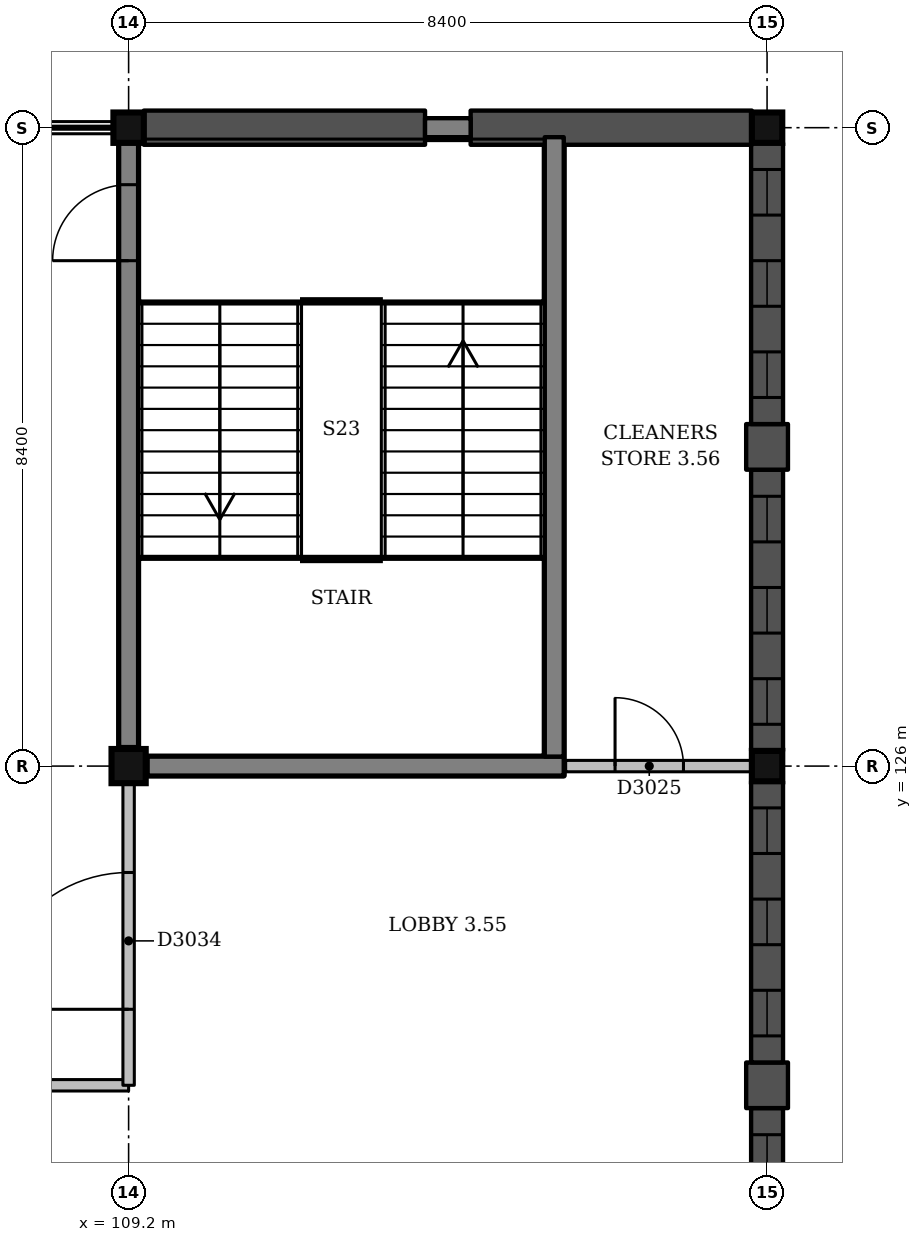
"""IFC4 building model, lengths in metres.
Left out: names, types, materials, properties, quantities, classifications, styles, units other than length and angle.
Written with IfcOpenShell. Run it as: python <this file> out.ifc"""

import sys

from ifc_helpers import new_model, si_unit, direction, frame, frame_2d, origin, origin_2d, place, context, subcontext, project, spatial, rectangle, extrude, element, fill, save


model = new_model("IFC4")
c1 = context("Model", 3, precision=1e-05, world=origin(), true_north=direction((0.0, 1.0)))
c2 = subcontext(c1, "Body", "Model", "MODEL_VIEW")
j1 = project(units=[si_unit("LENGTHUNIT", "METRE"), si_unit("PLANEANGLEUNIT", "RADIAN")], contexts=[c1])
p1 = place(None, origin())
s1 = spatial("IfcSite", under=j1, at=p1, CompositionType="ELEMENT")
p2 = place(p1, origin())
s2 = spatial("IfcBuilding", under=s1, at=p2, CompositionType="ELEMENT")
p3 = place(p2, frame((0.0, 0.0, 13.5)))
s3 = spatial("IfcBuildingStorey", under=s2, at=p3, CompositionType="ELEMENT", Elevation=13.5)
p4 = place(p3, frame((109.2, 126.0, 0.0), z_axis=(0.0, 0.0, 1.0), x_axis=(1.0, 0.0, 0.0)))
e1 = element("IfcColumn", 1, at=p4, inside=s3, PredefinedType="COLUMN", context=c2, shape_type="SweptSolid", body=[
    extrude(rectangle(XDim=0.45, YDim=0.45, at=origin_2d()), origin(), (0.0, 0.0, 1.0), 4.5),
])
for number, where, z_axis, x_axis in (
    (2, (109.2, 134.4, 0.0), (0.0, 0.0, 1.0), (1.0, 0.0, 0.0)),
    (3, (117.6, 126.0, 0.0), (0.0, 0.0, 1.0), (1.0, 0.0, 0.0)),
    (4, (117.6, 134.4, 0.0), (0.0, 0.0, 1.0), (1.0, 0.0, 0.0)),
):
    element("IfcColumn", number, at=place(p3, frame(where, z_axis=z_axis, x_axis=x_axis)), inside=s3, PredefinedType="COLUMN", context=c2, shape_type="SweptSolid", body=[
        extrude(rectangle(XDim=0.4, YDim=0.4, at=origin_2d()), origin(), (0.0, 0.0, 1.0), 4.5),
    ])
p5 = place(p3, frame((109.45, 126.0, 0.0), z_axis=(0.0, 0.0, 1.0), x_axis=(1.0, 0.0, 0.0)))
e5 = element("IfcWall", 5, at=p5, inside=s3, PredefinedType="SHEAR", context=c2, shape_type="SweptSolid", body=[
    extrude(rectangle(XDim=5.475, YDim=0.25, at=frame_2d((2.738, 0.0))), origin(), (0.0, 0.0, 1.0), 4.5),
])
p6 = place(p3, frame((109.2, 126.25, 0.0), z_axis=(0.0, 0.0, 1.0), x_axis=(0.0, 1.0, 0.0)))
e6 = element("IfcWall", 6, at=p6, inside=s3, PredefinedType="SHEAR", context=c2, shape_type="SweptSolid", body=[
    extrude(rectangle(XDim=7.95, YDim=0.25, at=frame_2d((3.975, 0.0))), origin(), (0.0, 0.0, 1.0), 4.5),
])
p7 = place(p6, frame((6.4, 0.0, 0.0)))
e7 = element("IfcOpeningElement", 7, at=p7, cuts=e6, PredefinedType="OPENING", context=c2, shape_type="SweptSolid", body=[
    extrude(rectangle(XDim=1.0, YDim=2.1, at=frame_2d((0.5, 1.05))), frame((0.0, 0.135, 0.0), z_axis=(0.0, -1.0, 0.0), x_axis=(1.0, 0.0, 0.0)), (0.0, 0.0, 1.0), 0.27),
])
p8 = place(p3, frame((114.8, 126.125, 0.0), z_axis=(0.0, 0.0, 1.0), x_axis=(0.0, 1.0, 0.0)))
e8 = element("IfcWall", 8, at=p8, inside=s3, PredefinedType="SHEAR", context=c2, shape_type="SweptSolid", body=[
    extrude(rectangle(XDim=8.15, YDim=0.25, at=frame_2d((4.075, 0.0))), origin(), (0.0, 0.0, 1.0), 4.5),
])
p9 = place(p3, frame((117.6, 117.8, 0.0), z_axis=(0.0, 0.0, 1.0), x_axis=(0.0, 1.0, 0.0)))
e9 = element("IfcWall", 9, at=p9, inside=s3, PredefinedType="SOLIDWALL", context=c2, shape_type="SweptSolid", body=[
    extrude(rectangle(XDim=3.7, YDim=0.42, at=frame_2d((1.85, 0.0))), origin(), (0.0, 0.0, 1.0), 3.45),
])
p10 = place(p9, frame((0.35, 0.0, 1.0)))
e10 = element("IfcOpeningElement", 10, at=p10, cuts=e9, PredefinedType="OPENING", context=c2, shape_type="SweptSolid", body=[
    extrude(rectangle(XDim=0.6, YDim=2.1, at=frame_2d((0.3, 1.05))), frame((0.0, 0.22, 0.0), z_axis=(0.0, -1.0, 0.0), x_axis=(1.0, 0.0, 0.0)), (0.0, 0.0, 1.0), 0.44),
])
p11 = place(p9, frame((1.55, 0.0, 1.0)))
e11 = element("IfcOpeningElement", 11, at=p11, cuts=e9, PredefinedType="OPENING", context=c2, shape_type="SweptSolid", body=[
    extrude(rectangle(XDim=0.6, YDim=2.1, at=frame_2d((0.3, 1.05))), frame((0.0, 0.22, 0.0), z_axis=(0.0, -1.0, 0.0), x_axis=(1.0, 0.0, 0.0)), (0.0, 0.0, 1.0), 0.44),
])
p12 = place(p9, frame((2.75, 0.0, 1.0)))
e12 = element("IfcOpeningElement", 12, at=p12, cuts=e9, PredefinedType="OPENING", context=c2, shape_type="SweptSolid", body=[
    extrude(rectangle(XDim=0.6, YDim=2.1, at=frame_2d((0.3, 1.05))), frame((0.0, 0.22, 0.0), z_axis=(0.0, -1.0, 0.0), x_axis=(1.0, 0.0, 0.0)), (0.0, 0.0, 1.0), 0.44),
])
p13 = place(p3, frame((117.6, 121.5, 0.0), z_axis=(0.0, 0.0, 1.0), x_axis=(0.0, 1.0, 0.0)))
e13 = element("IfcWall", 13, at=p13, inside=s3, PredefinedType="SOLIDWALL", context=c2, shape_type="SweptSolid", body=[
    extrude(rectangle(XDim=0.6, YDim=0.55, at=frame_2d((0.3, 0.0))), origin(), (0.0, 0.0, 1.0), 3.45),
])
p14 = place(p3, frame((117.6, 122.1, 0.0), z_axis=(0.0, 0.0, 1.0), x_axis=(0.0, 1.0, 0.0)))
e14 = element("IfcWall", 14, at=p14, inside=s3, PredefinedType="SOLIDWALL", context=c2, shape_type="SweptSolid", body=[
    extrude(rectangle(XDim=3.7, YDim=0.42, at=frame_2d((1.85, 0.0))), origin(), (0.0, 0.0, 1.0), 3.45),
])
p15 = place(p14, frame((0.35, 0.0, 1.0)))
e15 = element("IfcOpeningElement", 15, at=p15, cuts=e14, PredefinedType="OPENING", context=c2, shape_type="SweptSolid", body=[
    extrude(rectangle(XDim=0.6, YDim=2.1, at=frame_2d((0.3, 1.05))), frame((0.0, 0.22, 0.0), z_axis=(0.0, -1.0, 0.0), x_axis=(1.0, 0.0, 0.0)), (0.0, 0.0, 1.0), 0.44),
])
p16 = place(p14, frame((1.55, 0.0, 1.0)))
e16 = element("IfcOpeningElement", 16, at=p16, cuts=e14, PredefinedType="OPENING", context=c2, shape_type="SweptSolid", body=[
    extrude(rectangle(XDim=0.6, YDim=2.1, at=frame_2d((0.3, 1.05))), frame((0.0, 0.22, 0.0), z_axis=(0.0, -1.0, 0.0), x_axis=(1.0, 0.0, 0.0)), (0.0, 0.0, 1.0), 0.44),
])
p17 = place(p14, frame((2.75, 0.0, 1.0)))
e17 = element("IfcOpeningElement", 17, at=p17, cuts=e14, PredefinedType="OPENING", context=c2, shape_type="SweptSolid", body=[
    extrude(rectangle(XDim=0.6, YDim=2.1, at=frame_2d((0.3, 1.05))), frame((0.0, 0.22, 0.0), z_axis=(0.0, -1.0, 0.0), x_axis=(1.0, 0.0, 0.0)), (0.0, 0.0, 1.0), 0.44),
])
p18 = place(p3, frame((117.6, 126.2, 0.0), z_axis=(0.0, 0.0, 1.0), x_axis=(0.0, 1.0, 0.0)))
e18 = element("IfcWall", 18, at=p18, inside=s3, PredefinedType="SOLIDWALL", context=c2, shape_type="SweptSolid", body=[
    extrude(rectangle(XDim=3.7, YDim=0.42, at=frame_2d((1.85, 0.0))), origin(), (0.0, 0.0, 1.0), 3.45),
])
p19 = place(p18, frame((0.35, 0.0, 1.0)))
e19 = element("IfcOpeningElement", 19, at=p19, cuts=e18, PredefinedType="OPENING", context=c2, shape_type="SweptSolid", body=[
    extrude(rectangle(XDim=0.6, YDim=2.1, at=frame_2d((0.3, 1.05))), frame((0.0, 0.22, 0.0), z_axis=(0.0, -1.0, 0.0), x_axis=(1.0, 0.0, 0.0)), (0.0, 0.0, 1.0), 0.44),
])
p20 = place(p18, frame((1.55, 0.0, 1.0)))
e20 = element("IfcOpeningElement", 20, at=p20, cuts=e18, PredefinedType="OPENING", context=c2, shape_type="SweptSolid", body=[
    extrude(rectangle(XDim=0.6, YDim=2.1, at=frame_2d((0.3, 1.05))), frame((0.0, 0.22, 0.0), z_axis=(0.0, -1.0, 0.0), x_axis=(1.0, 0.0, 0.0)), (0.0, 0.0, 1.0), 0.44),
])
p21 = place(p18, frame((2.75, 0.0, 1.0)))
e21 = element("IfcOpeningElement", 21, at=p21, cuts=e18, PredefinedType="OPENING", context=c2, shape_type="SweptSolid", body=[
    extrude(rectangle(XDim=0.6, YDim=2.1, at=frame_2d((0.3, 1.05))), frame((0.0, 0.22, 0.0), z_axis=(0.0, -1.0, 0.0), x_axis=(1.0, 0.0, 0.0)), (0.0, 0.0, 1.0), 0.44),
])
p22 = place(p3, frame((117.6, 129.9, 0.0), z_axis=(0.0, 0.0, 1.0), x_axis=(0.0, 1.0, 0.0)))
e22 = element("IfcWall", 22, at=p22, inside=s3, PredefinedType="SOLIDWALL", context=c2, shape_type="SweptSolid", body=[
    extrude(rectangle(XDim=0.6, YDim=0.55, at=frame_2d((0.3, 0.0))), origin(), (0.0, 0.0, 1.0), 3.45),
])
p23 = place(p3, frame((117.6, 130.5, 0.0), z_axis=(0.0, 0.0, 1.0), x_axis=(0.0, 1.0, 0.0)))
e23 = element("IfcWall", 23, at=p23, inside=s3, PredefinedType="SOLIDWALL", context=c2, shape_type="SweptSolid", body=[
    extrude(rectangle(XDim=3.7, YDim=0.42, at=frame_2d((1.85, 0.0))), origin(), (0.0, 0.0, 1.0), 3.45),
])
p24 = place(p23, frame((0.35, 0.0, 1.0)))
e24 = element("IfcOpeningElement", 24, at=p24, cuts=e23, PredefinedType="OPENING", context=c2, shape_type="SweptSolid", body=[
    extrude(rectangle(XDim=0.6, YDim=2.1, at=frame_2d((0.3, 1.05))), frame((0.0, 0.22, 0.0), z_axis=(0.0, -1.0, 0.0), x_axis=(1.0, 0.0, 0.0)), (0.0, 0.0, 1.0), 0.44),
])
p25 = place(p23, frame((1.55, 0.0, 1.0)))
e25 = element("IfcOpeningElement", 25, at=p25, cuts=e23, PredefinedType="OPENING", context=c2, shape_type="SweptSolid", body=[
    extrude(rectangle(XDim=0.6, YDim=2.1, at=frame_2d((0.3, 1.05))), frame((0.0, 0.22, 0.0), z_axis=(0.0, -1.0, 0.0), x_axis=(1.0, 0.0, 0.0)), (0.0, 0.0, 1.0), 0.44),
])
p26 = place(p23, frame((2.75, 0.0, 1.0)))
e26 = element("IfcOpeningElement", 26, at=p26, cuts=e23, PredefinedType="OPENING", context=c2, shape_type="SweptSolid", body=[
    extrude(rectangle(XDim=0.6, YDim=2.1, at=frame_2d((0.3, 1.05))), frame((0.0, 0.22, 0.0), z_axis=(0.0, -1.0, 0.0), x_axis=(1.0, 0.0, 0.0)), (0.0, 0.0, 1.0), 0.44),
])
p27 = place(p3, frame((117.4, 134.4, 0.0), z_axis=(0.0, 0.0, 1.0), x_axis=(-1.0, 0.0, 0.0)))
e27 = element("IfcWall", 27, at=p27, inside=s3, PredefinedType="SOLIDWALL", context=c2, shape_type="SweptSolid", body=[
    extrude(rectangle(XDim=3.7, YDim=0.45, at=frame_2d((1.85, 0.0))), origin(), (0.0, 0.0, 1.0), 3.45),
])
p28 = place(p3, frame((113.1, 134.4, 0.0), z_axis=(0.0, 0.0, 1.0), x_axis=(-1.0, 0.0, 0.0)))
e28 = element("IfcWall", 28, at=p28, inside=s3, PredefinedType="SOLIDWALL", context=c2, shape_type="SweptSolid", body=[
    extrude(rectangle(XDim=3.7, YDim=0.45, at=frame_2d((1.85, 0.0))), origin(), (0.0, 0.0, 1.0), 3.45),
])
p29 = place(p3, frame((92.4, 121.8, 0.0), z_axis=(0.0, 0.0, 1.0), x_axis=(1.0, 0.0, 0.0)))
e29 = element("IfcWall", 29, at=p29, inside=s3, PredefinedType="PARTITIONING", context=c2, shape_type="SweptSolid", body=[
    extrude(rectangle(XDim=16.8, YDim=0.15, at=frame_2d((8.4, 0.0))), origin(), (0.0, 0.0, 1.0), 3.4),
])
p30 = place(p29, frame((0.3, 0.0, 0.0)))
e30 = element("IfcOpeningElement", 30, at=p30, cuts=e29, PredefinedType="OPENING", context=c2, shape_type="SweptSolid", body=[
    extrude(rectangle(XDim=1.8, YDim=2.1, at=frame_2d((0.9, 1.05))), frame((0.0, 0.085, 0.0), z_axis=(0.0, -1.0, 0.0), x_axis=(1.0, 0.0, 0.0)), (0.0, 0.0, 1.0), 0.17),
])
p31 = place(p3, frame((114.95, 126.0, 0.0), z_axis=(0.0, 0.0, 1.0), x_axis=(1.0, 0.0, 0.0)))
e31 = element("IfcWall", 31, at=p31, inside=s3, PredefinedType="PARTITIONING", context=c2, shape_type="SweptSolid", body=[
    extrude(rectangle(XDim=2.45, YDim=0.15, at=frame_2d((1.225, 0.0))), origin(), (0.0, 0.0, 1.0), 3.6),
])
p32 = place(p31, frame((0.65, 0.0, 0.0)))
e32 = element("IfcOpeningElement", 32, at=p32, cuts=e31, PredefinedType="OPENING", context=c2, shape_type="SweptSolid", body=[
    extrude(rectangle(XDim=0.9, YDim=2.1, at=frame_2d((0.45, 1.05))), frame((0.0, 0.085, 0.0), z_axis=(0.0, -1.0, 0.0), x_axis=(1.0, 0.0, 0.0)), (0.0, 0.0, 1.0), 0.17),
])
p33 = place(p3, frame((109.2, 121.8, 0.0), z_axis=(0.0, 0.0, 1.0), x_axis=(0.0, 1.0, 0.0)))
e33 = element("IfcWall", 33, at=p33, inside=s3, PredefinedType="PARTITIONING", context=c2, shape_type="SweptSolid", body=[
    extrude(rectangle(XDim=3.975, YDim=0.15, at=frame_2d((1.987, 0.0))), origin(), (0.0, 0.0, 1.0), 3.5),
])
p34 = place(p33, frame((1.0, 0.0, 0.0)))
e34 = element("IfcOpeningElement", 34, at=p34, cuts=e33, PredefinedType="OPENING", context=c2, shape_type="SweptSolid", body=[
    extrude(rectangle(XDim=1.8, YDim=2.1, at=frame_2d((0.9, 1.05))), frame((0.0, 0.085, 0.0), z_axis=(0.0, -1.0, 0.0), x_axis=(1.0, 0.0, 0.0)), (0.0, 0.0, 1.0), 0.17),
])
p35 = place(p3, frame((113.1, 134.4, 0.0), z_axis=(0.0, 0.0, 1.0), x_axis=(1.0, 0.0, 0.0)))
e35 = element("IfcWall", 35, at=p35, inside=s3, PredefinedType="SHEAR", context=c2, shape_type="SweptSolid", body=[
    extrude(rectangle(XDim=0.6, YDim=0.25, at=frame_2d((0.3, 0.0))), origin(), (0.0, 0.0, 1.0), 4.5),
])
p36 = place(p12, origin())
e36 = element("IfcWindow", 36, at=p36, inside=s3, PartitioningType="SINGLE_PANEL", PredefinedType="WINDOW", context=c2, shape_type="SweptSolid", body=[
    extrude(rectangle(XDim=0.6, YDim=2.1, at=frame_2d((0.3, 1.05))), frame((0.0, 0.15, 0.0), z_axis=(0.0, -1.0, 0.0), x_axis=(1.0, 0.0, 0.0)), (0.0, 0.0, 1.0), 0.06),
])
fill(e12, e36)
p37 = place(p15, origin())
e37 = element("IfcWindow", 37, at=p37, inside=s3, PartitioningType="SINGLE_PANEL", PredefinedType="WINDOW", context=c2, shape_type="SweptSolid", body=[
    extrude(rectangle(XDim=0.6, YDim=2.1, at=frame_2d((0.3, 1.05))), frame((0.0, 0.15, 0.0), z_axis=(0.0, -1.0, 0.0), x_axis=(1.0, 0.0, 0.0)), (0.0, 0.0, 1.0), 0.06),
])
fill(e15, e37)
p38 = place(p16, origin())
e38 = element("IfcWindow", 38, at=p38, inside=s3, PartitioningType="SINGLE_PANEL", PredefinedType="WINDOW", context=c2, shape_type="SweptSolid", body=[
    extrude(rectangle(XDim=0.6, YDim=2.1, at=frame_2d((0.3, 1.05))), frame((0.0, 0.15, 0.0), z_axis=(0.0, -1.0, 0.0), x_axis=(1.0, 0.0, 0.0)), (0.0, 0.0, 1.0), 0.06),
])
fill(e16, e38)
p39 = place(p17, origin())
e39 = element("IfcWindow", 39, at=p39, inside=s3, PartitioningType="SINGLE_PANEL", PredefinedType="WINDOW", context=c2, shape_type="SweptSolid", body=[
    extrude(rectangle(XDim=0.6, YDim=2.1, at=frame_2d((0.3, 1.05))), frame((0.0, 0.15, 0.0), z_axis=(0.0, -1.0, 0.0), x_axis=(1.0, 0.0, 0.0)), (0.0, 0.0, 1.0), 0.06),
])
fill(e17, e39)
p40 = place(p19, origin())
e40 = element("IfcWindow", 40, at=p40, inside=s3, PartitioningType="SINGLE_PANEL", PredefinedType="WINDOW", context=c2, shape_type="SweptSolid", body=[
    extrude(rectangle(XDim=0.6, YDim=2.1, at=frame_2d((0.3, 1.05))), frame((0.0, 0.15, 0.0), z_axis=(0.0, -1.0, 0.0), x_axis=(1.0, 0.0, 0.0)), (0.0, 0.0, 1.0), 0.06),
])
fill(e19, e40)
p41 = place(p20, origin())
e41 = element("IfcWindow", 41, at=p41, inside=s3, PartitioningType="SINGLE_PANEL", PredefinedType="WINDOW", context=c2, shape_type="SweptSolid", body=[
    extrude(rectangle(XDim=0.6, YDim=2.1, at=frame_2d((0.3, 1.05))), frame((0.0, 0.15, 0.0), z_axis=(0.0, -1.0, 0.0), x_axis=(1.0, 0.0, 0.0)), (0.0, 0.0, 1.0), 0.06),
])
fill(e20, e41)
p42 = place(p21, origin())
e42 = element("IfcWindow", 42, at=p42, inside=s3, PartitioningType="SINGLE_PANEL", PredefinedType="WINDOW", context=c2, shape_type="SweptSolid", body=[
    extrude(rectangle(XDim=0.6, YDim=2.1, at=frame_2d((0.3, 1.05))), frame((0.0, 0.15, 0.0), z_axis=(0.0, -1.0, 0.0), x_axis=(1.0, 0.0, 0.0)), (0.0, 0.0, 1.0), 0.06),
])
fill(e21, e42)
p43 = place(p24, origin())
e43 = element("IfcWindow", 43, at=p43, inside=s3, PartitioningType="SINGLE_PANEL", PredefinedType="WINDOW", context=c2, shape_type="SweptSolid", body=[
    extrude(rectangle(XDim=0.6, YDim=2.1, at=frame_2d((0.3, 1.05))), frame((0.0, 0.15, 0.0), z_axis=(0.0, -1.0, 0.0), x_axis=(1.0, 0.0, 0.0)), (0.0, 0.0, 1.0), 0.06),
])
fill(e24, e43)
p44 = place(p25, origin())
e44 = element("IfcWindow", 44, at=p44, inside=s3, PartitioningType="SINGLE_PANEL", PredefinedType="WINDOW", context=c2, shape_type="SweptSolid", body=[
    extrude(rectangle(XDim=0.6, YDim=2.1, at=frame_2d((0.3, 1.05))), frame((0.0, 0.15, 0.0), z_axis=(0.0, -1.0, 0.0), x_axis=(1.0, 0.0, 0.0)), (0.0, 0.0, 1.0), 0.06),
])
fill(e25, e44)
p45 = place(p26, origin())
e45 = element("IfcWindow", 45, at=p45, inside=s3, PartitioningType="SINGLE_PANEL", PredefinedType="WINDOW", context=c2, shape_type="SweptSolid", body=[
    extrude(rectangle(XDim=0.6, YDim=2.1, at=frame_2d((0.3, 1.05))), frame((0.0, 0.15, 0.0), z_axis=(0.0, -1.0, 0.0), x_axis=(1.0, 0.0, 0.0)), (0.0, 0.0, 1.0), 0.06),
])
fill(e26, e45)
p46 = place(p32, origin())
e46 = element("IfcDoor", 46, at=p46, inside=s3, OperationType="SINGLE_SWING_LEFT", PredefinedType="DOOR", context=c2, shape_type="SweptSolid", body=[
    extrude(rectangle(XDim=0.9, YDim=2.1, at=frame_2d((0.45, 1.05))), frame((0.0, 0.025, 0.0), z_axis=(0.0, -1.0, 0.0), x_axis=(1.0, 0.0, 0.0)), (0.0, 0.0, 1.0), 0.05),
])
fill(e32, e46)
p47 = place(p34, origin())
e47 = element("IfcDoor", 47, at=p47, inside=s3, OperationType="DOUBLE_DOOR_SINGLE_SWING", PredefinedType="DOOR", context=c2, shape_type="SweptSolid", body=[
    extrude(rectangle(XDim=1.8, YDim=2.1, at=frame_2d((0.9, 1.05))), frame((0.0, 0.025, 0.0), z_axis=(0.0, -1.0, 0.0), x_axis=(1.0, 0.0, 0.0)), (0.0, 0.0, 1.0), 0.05),
])
fill(e34, e47)
p48 = place(p7, origin())
e48 = element("IfcDoor", 48, at=p48, inside=s3, OperationType="SINGLE_SWING_LEFT", PredefinedType="DOOR", context=c2, shape_type="SweptSolid", body=[
    extrude(rectangle(XDim=1.0, YDim=2.1, at=frame_2d((0.5, 1.05))), frame((0.0, 0.025, 0.0), z_axis=(0.0, -1.0, 0.0), x_axis=(1.0, 0.0, 0.0)), (0.0, 0.0, 1.0), 0.05),
])
fill(e7, e48)
save(model, sys.argv[1])
